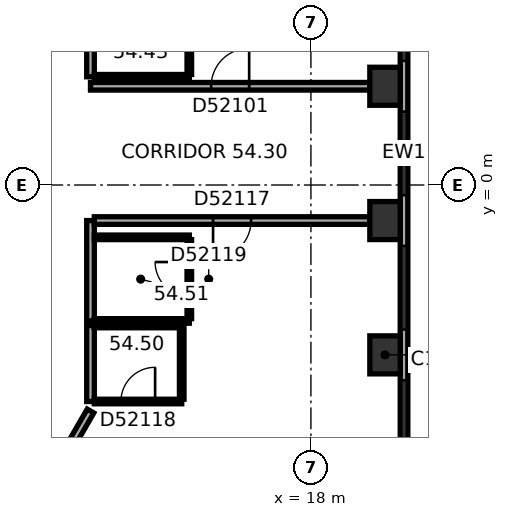
"""IFC4 building model, lengths in metres.
Left out: names, types, materials, properties, quantities, classifications, styles, units other than length and angle.
Written with IfcOpenShell. Run it as: python <this file> out.ifc"""

import sys

from ifc_helpers import new_model, si_unit, direction, frame, frame_2d, origin, origin_2d, place, context, subcontext, project, spatial, rectangle, extrude, element, fill, save


model = new_model("IFC4")
c1 = context("Model", 3, precision=1e-05, world=origin(), true_north=direction((0.0, 1.0)))
c2 = subcontext(c1, "Body", "Model", "MODEL_VIEW")
j1 = project(units=[si_unit("LENGTHUNIT", "METRE"), si_unit("PLANEANGLEUNIT", "RADIAN")], contexts=[c1])
p1 = place(None, origin())
s1 = spatial("IfcSite", under=j1, at=p1, CompositionType="ELEMENT")
p2 = place(p1, origin())
s2 = spatial("IfcBuilding", under=s1, at=p2, CompositionType="ELEMENT")
p3 = place(p2, frame((0.0, 0.0, 221.7)))
s3 = spatial("IfcBuildingStorey", under=s2, at=p3, CompositionType="ELEMENT", Elevation=221.7)
for number, where, z_axis, x_axis in (
    (1, (19.95, -4.469, 0.0), (0.0, 0.0, 1.0), (0.0, 1.0, 0.0)),
    (2, (19.95, -0.936, 0.0), (0.0, 0.0, 1.0), (0.0, 1.0, 0.0)),
    (3, (19.95, 2.598, 0.0), (0.0, 0.0, 1.0), (0.0, 1.0, 0.0)),
):
    element("IfcColumn", number, at=place(p3, frame(where, z_axis=z_axis, x_axis=x_axis)), inside=s3, PredefinedType="COLUMN", context=c2, shape_type="SweptSolid", body=[
        extrude(rectangle(XDim=1.0, YDim=0.8, at=origin_2d()), origin(), (0.0, 0.0, 1.0), 3.7),
    ])
p4 = place(p3, frame((20.45, -8.59, 0.0), z_axis=(0.0, 0.0, 1.0), x_axis=(0.0, 1.0, 0.0)))
e4 = element("IfcWall", 4, at=p4, inside=s3, PredefinedType="STANDARD", context=c2, shape_type="SweptSolid", body=[
    extrude(rectangle(XDim=18.841, YDim=0.2, at=frame_2d((9.421, 0.0))), origin(), (0.0, 0.0, 1.0), 3.7),
])
p5 = place(p4, frame((1.254, 0.0, 0.9)))
e5 = element("IfcOpeningElement", 5, at=p5, cuts=e4, PredefinedType="OPENING", context=c2, shape_type="SweptSolid", body=[
    extrude(rectangle(XDim=2.2, YDim=2.0, at=frame_2d((1.1, 1.0))), frame((0.0, 0.11, 0.0), z_axis=(0.0, -1.0, 0.0), x_axis=(1.0, 0.0, 0.0)), (0.0, 0.0, 1.0), 0.22),
])
p6 = place(p4, frame((4.788, 0.0, 0.9)))
e6 = element("IfcOpeningElement", 6, at=p6, cuts=e4, PredefinedType="OPENING", context=c2, shape_type="SweptSolid", body=[
    extrude(rectangle(XDim=2.2, YDim=2.0, at=frame_2d((1.1, 1.0))), frame((0.0, 0.11, 0.0), z_axis=(0.0, -1.0, 0.0), x_axis=(1.0, 0.0, 0.0)), (0.0, 0.0, 1.0), 0.22),
])
p7 = place(p4, frame((8.322, 0.0, 0.9)))
e7 = element("IfcOpeningElement", 7, at=p7, cuts=e4, PredefinedType="OPENING", context=c2, shape_type="SweptSolid", body=[
    extrude(rectangle(XDim=2.2, YDim=2.0, at=frame_2d((1.1, 1.0))), frame((0.0, 0.11, 0.0), z_axis=(0.0, -1.0, 0.0), x_axis=(1.0, 0.0, 0.0)), (0.0, 0.0, 1.0), 0.22),
])
p8 = place(p4, frame((11.855, 0.0, 0.9)))
e8 = element("IfcOpeningElement", 8, at=p8, cuts=e4, PredefinedType="OPENING", context=c2, shape_type="SweptSolid", body=[
    extrude(rectangle(XDim=2.2, YDim=2.0, at=frame_2d((1.1, 1.0))), frame((0.0, 0.11, 0.0), z_axis=(0.0, -1.0, 0.0), x_axis=(1.0, 0.0, 0.0)), (0.0, 0.0, 1.0), 0.22),
])
p9 = place(p4, frame((15.389, 0.0, 0.9)))
e9 = element("IfcOpeningElement", 9, at=p9, cuts=e4, PredefinedType="OPENING", context=c2, shape_type="SweptSolid", body=[
    extrude(rectangle(XDim=2.2, YDim=2.0, at=frame_2d((1.1, 1.0))), frame((0.0, 0.11, 0.0), z_axis=(0.0, -1.0, 0.0), x_axis=(1.0, 0.0, 0.0)), (0.0, 0.0, 1.0), 0.22),
])
p10 = place(p3, frame((11.27, -7.558, 0.0), z_axis=(0.0, 0.0, 1.0), x_axis=(0.499964847546, 0.866045698112, 0.0)))
e10 = element("IfcWall", 10, at=p10, inside=s3, PredefinedType="PARTITIONING", context=c2, shape_type="SweptSolid", body=[
    extrude(rectangle(XDim=1.86, YDim=0.2, at=frame_2d((0.93, 0.0))), origin(), (0.0, 0.0, 1.0), 3.42),
])
p11 = place(p3, frame((12.2, -5.697, 0.0), z_axis=(0.0, 0.0, 1.0), x_axis=(0.0, 1.0, 0.0)))
e11 = element("IfcWall", 11, at=p11, inside=s3, PredefinedType="PARTITIONING", context=c2, shape_type="SweptSolid", body=[
    extrude(rectangle(XDim=2.0, YDim=0.2, at=frame_2d((1.0, 0.0))), origin(), (0.0, 0.0, 1.0), 3.42),
])
p12 = place(p3, frame((12.2, -3.577, 0.0), z_axis=(0.0, 0.0, 1.0), x_axis=(0.0, 1.0, 0.0)))
e12 = element("IfcWall", 12, at=p12, inside=s3, PredefinedType="PARTITIONING", context=c2, shape_type="SweptSolid", body=[
    extrude(rectangle(XDim=2.641, YDim=0.2, at=frame_2d((1.321, 0.0))), origin(), (0.0, 0.0, 1.0), 3.42),
])
p13 = place(p3, frame((12.2, 2.848, 0.0), z_axis=(0.0, 0.0, 1.0), x_axis=(0.0, 1.0, 0.0)))
e13 = element("IfcWall", 13, at=p13, inside=s3, PredefinedType="PARTITIONING", context=c2, shape_type="SweptSolid", body=[
    extrude(rectangle(XDim=3.099, YDim=0.2, at=frame_2d((1.549, 0.0))), origin(), (0.0, 0.0, 1.0), 3.42),
])
p14 = place(p3, frame((12.3, -3.697, 0.0), z_axis=(0.0, 0.0, 1.0), x_axis=(1.0, 0.0, 0.0)))
e14 = element("IfcWall", 14, at=p14, inside=s3, PredefinedType="PARTITIONING", context=c2, shape_type="SweptSolid", body=[
    extrude(rectangle(XDim=2.3, YDim=0.12, at=frame_2d((1.15, 0.0))), origin(), (0.0, 0.0, 1.0), 3.42),
])
p15 = place(p3, frame((12.3, -1.377, 0.0), z_axis=(0.0, 0.0, 1.0), x_axis=(1.0, 0.0, 0.0)))
e15 = element("IfcWall", 15, at=p15, inside=s3, PredefinedType="PARTITIONING", context=c2, shape_type="SweptSolid", body=[
    extrude(rectangle(XDim=2.5, YDim=0.12, at=frame_2d((1.25, 0.0))), origin(), (0.0, 0.0, 1.0), 3.42),
])
p16 = place(p3, frame((12.3, -0.936, 0.0), z_axis=(0.0, 0.0, 1.0), x_axis=(1.0, 0.0, 0.0)))
e16 = element("IfcWall", 16, at=p16, inside=s3, PredefinedType="PARTITIONING", context=c2, shape_type="SweptSolid", body=[
    extrude(rectangle(XDim=7.25, YDim=0.2, at=frame_2d((3.625, 0.0))), origin(), (0.0, 0.0, 1.0), 2.87),
])
p17 = place(p16, frame((3.125, 0.0, 0.0)))
e17 = element("IfcOpeningElement", 17, at=p17, cuts=e16, PredefinedType="OPENING", context=c2, shape_type="SweptSolid", body=[
    extrude(rectangle(XDim=1.0, YDim=2.1, at=frame_2d((0.5, 1.05))), frame((0.0, 0.11, 0.0), z_axis=(0.0, -1.0, 0.0), x_axis=(1.0, 0.0, 0.0)), (0.0, 0.0, 1.0), 0.22),
])
p18 = place(p3, frame((14.6, -5.697, 0.0), z_axis=(0.0, 0.0, 1.0), x_axis=(-1.0, 0.0, 0.0)))
e18 = element("IfcWall", 18, at=p18, inside=s3, PredefinedType="PARTITIONING", context=c2, shape_type="SweptSolid", body=[
    extrude(rectangle(XDim=2.3, YDim=0.12, at=frame_2d((1.15, 0.0))), origin(), (0.0, 0.0, 1.0), 3.42),
])
p19 = place(p18, frame((0.7, 0.0, 0.0)))
e19 = element("IfcOpeningElement", 19, at=p19, cuts=e18, PredefinedType="OPENING", context=c2, shape_type="SweptSolid", body=[
    extrude(rectangle(XDim=0.9, YDim=2.1, at=frame_2d((0.45, 1.05))), frame((0.0, 0.07, 0.0), z_axis=(0.0, -1.0, 0.0), x_axis=(1.0, 0.0, 0.0)), (0.0, 0.0, 1.0), 0.14),
])
p20 = place(p3, frame((14.6, -3.757, 0.0), z_axis=(0.0, 0.0, 1.0), x_axis=(0.0, -1.0, 0.0)))
e20 = element("IfcWall", 20, at=p20, inside=s3, PredefinedType="PARTITIONING", context=c2, shape_type="SweptSolid", body=[
    extrude(rectangle(XDim=1.88, YDim=0.12, at=frame_2d((0.94, 0.0))), origin(), (0.0, 0.0, 1.0), 3.42),
])
p21 = place(p3, frame((14.8, -3.577, 0.0), z_axis=(0.0, 0.0, 1.0), x_axis=(-1.0, 0.0, 0.0)))
e21 = element("IfcWall", 21, at=p21, inside=s3, PredefinedType="PARTITIONING", context=c2, shape_type="SweptSolid", body=[
    extrude(rectangle(XDim=2.5, YDim=0.12, at=frame_2d((1.25, 0.0))), origin(), (0.0, 0.0, 1.0), 3.42),
])
p22 = place(p3, frame((14.8, -1.437, 0.0), z_axis=(0.0, 0.0, 1.0), x_axis=(0.0, -1.0, 0.0)))
e22 = element("IfcWall", 22, at=p22, inside=s3, PredefinedType="PARTITIONING", context=c2, shape_type="SweptSolid", body=[
    extrude(rectangle(XDim=2.08, YDim=0.12, at=frame_2d((1.04, 0.0))), origin(), (0.0, 0.0, 1.0), 3.42),
])
p23 = place(p22, frame((0.59, 0.0, 0.0)))
e23 = element("IfcOpeningElement", 23, at=p23, cuts=e22, PredefinedType="OPENING", context=c2, shape_type="SweptSolid", body=[
    extrude(rectangle(XDim=0.9, YDim=2.1, at=frame_2d((0.45, 1.05))), frame((0.0, 0.07, 0.0), z_axis=(0.0, -1.0, 0.0), x_axis=(1.0, 0.0, 0.0)), (0.0, 0.0, 1.0), 0.14),
])
p24 = place(p3, frame((14.8, 2.848, 0.0), z_axis=(0.0, 0.0, 1.0), x_axis=(-1.0, 0.0, 0.0)))
e24 = element("IfcWall", 24, at=p24, inside=s3, PredefinedType="PARTITIONING", context=c2, shape_type="SweptSolid", body=[
    extrude(rectangle(XDim=2.5, YDim=0.12, at=frame_2d((1.25, 0.0))), origin(), (0.0, 0.0, 1.0), 3.42),
])
p25 = place(p3, frame((14.8, 4.988, 0.0), z_axis=(0.0, 0.0, 1.0), x_axis=(0.0, -1.0, 0.0)))
e25 = element("IfcWall", 25, at=p25, inside=s3, PredefinedType="PARTITIONING", context=c2, shape_type="SweptSolid", body=[
    extrude(rectangle(XDim=2.08, YDim=0.12, at=frame_2d((1.04, 0.0))), origin(), (0.0, 0.0, 1.0), 3.42),
])
p26 = place(p3, frame((19.55, 2.598, 0.0), z_axis=(0.0, 0.0, 1.0), x_axis=(-1.0, 0.0, 0.0)))
e26 = element("IfcWall", 26, at=p26, inside=s3, PredefinedType="PARTITIONING", context=c2, shape_type="SweptSolid", body=[
    extrude(rectangle(XDim=7.35, YDim=0.2, at=frame_2d((3.675, 0.0))), origin(), (0.0, 0.0, 1.0), 3.42),
])
p27 = place(p26, frame((3.175, 0.0, 0.0)))
e27 = element("IfcOpeningElement", 27, at=p27, cuts=e26, PredefinedType="OPENING", context=c2, shape_type="SweptSolid", body=[
    extrude(rectangle(XDim=1.0, YDim=2.1, at=frame_2d((0.5, 1.05))), frame((0.0, 0.11, 0.0), z_axis=(0.0, -1.0, 0.0), x_axis=(1.0, 0.0, 0.0)), (0.0, 0.0, 1.0), 0.22),
])
p28 = place(p5, origin())
e28 = element("IfcWindow", 28, at=p28, inside=s3, PartitioningType="SINGLE_PANEL", PredefinedType="WINDOW", context=c2, shape_type="SweptSolid", body=[
    extrude(rectangle(XDim=2.2, YDim=2.0, at=frame_2d((1.1, 1.0))), frame((0.0, 0.03, 0.0), z_axis=(0.0, -1.0, 0.0), x_axis=(1.0, 0.0, 0.0)), (0.0, 0.0, 1.0), 0.06),
])
fill(e5, e28)
p29 = place(p6, origin())
e29 = element("IfcWindow", 29, at=p29, inside=s3, PartitioningType="SINGLE_PANEL", PredefinedType="WINDOW", context=c2, shape_type="SweptSolid", body=[
    extrude(rectangle(XDim=2.2, YDim=2.0, at=frame_2d((1.1, 1.0))), frame((0.0, 0.03, 0.0), z_axis=(0.0, -1.0, 0.0), x_axis=(1.0, 0.0, 0.0)), (0.0, 0.0, 1.0), 0.06),
])
fill(e6, e29)
p30 = place(p7, origin())
e30 = element("IfcWindow", 30, at=p30, inside=s3, PartitioningType="SINGLE_PANEL", PredefinedType="WINDOW", context=c2, shape_type="SweptSolid", body=[
    extrude(rectangle(XDim=2.2, YDim=2.0, at=frame_2d((1.1, 1.0))), frame((0.0, 0.03, 0.0), z_axis=(0.0, -1.0, 0.0), x_axis=(1.0, 0.0, 0.0)), (0.0, 0.0, 1.0), 0.06),
])
fill(e7, e30)
p31 = place(p8, origin())
e31 = element("IfcWindow", 31, at=p31, inside=s3, PartitioningType="SINGLE_PANEL", PredefinedType="WINDOW", context=c2, shape_type="SweptSolid", body=[
    extrude(rectangle(XDim=2.2, YDim=2.0, at=frame_2d((1.1, 1.0))), frame((0.0, 0.03, 0.0), z_axis=(0.0, -1.0, 0.0), x_axis=(1.0, 0.0, 0.0)), (0.0, 0.0, 1.0), 0.06),
])
fill(e8, e31)
p32 = place(p27, origin())
e32 = element("IfcDoor", 32, at=p32, inside=s3, OperationType="SINGLE_SWING_LEFT", PredefinedType="DOOR", context=c2, shape_type="SweptSolid", body=[
    extrude(rectangle(XDim=1.0, YDim=2.1, at=frame_2d((0.5, 1.05))), frame((0.0, 0.025, 0.0), z_axis=(0.0, -1.0, 0.0), x_axis=(1.0, 0.0, 0.0)), (0.0, 0.0, 1.0), 0.05),
])
fill(e27, e32)
p33 = place(p17, origin())
e33 = element("IfcDoor", 33, at=p33, inside=s3, OperationType="SINGLE_SWING_LEFT", PredefinedType="DOOR", context=c2, shape_type="SweptSolid", body=[
    extrude(rectangle(XDim=1.0, YDim=2.1, at=frame_2d((0.5, 1.05))), frame((0.0, 0.025, 0.0), z_axis=(0.0, -1.0, 0.0), x_axis=(1.0, 0.0, 0.0)), (0.0, 0.0, 1.0), 0.05),
])
fill(e17, e33)
p34 = place(p19, origin())
e34 = element("IfcDoor", 34, at=p34, inside=s3, OperationType="SINGLE_SWING_LEFT", PredefinedType="DOOR", context=c2, shape_type="SweptSolid", body=[
    extrude(rectangle(XDim=0.9, YDim=2.1, at=frame_2d((0.45, 1.05))), frame((0.0, 0.025, 0.0), z_axis=(0.0, -1.0, 0.0), x_axis=(1.0, 0.0, 0.0)), (0.0, 0.0, 1.0), 0.05),
])
fill(e19, e34)
p35 = place(p23, origin())
e35 = element("IfcDoor", 35, at=p35, inside=s3, OperationType="SINGLE_SWING_LEFT", PredefinedType="DOOR", context=c2, shape_type="SweptSolid", body=[
    extrude(rectangle(XDim=0.9, YDim=2.1, at=frame_2d((0.45, 1.05))), frame((0.0, 0.025, 0.0), z_axis=(0.0, -1.0, 0.0), x_axis=(1.0, 0.0, 0.0)), (0.0, 0.0, 1.0), 0.05),
])
fill(e23, e35)
save(model, sys.argv[1])
